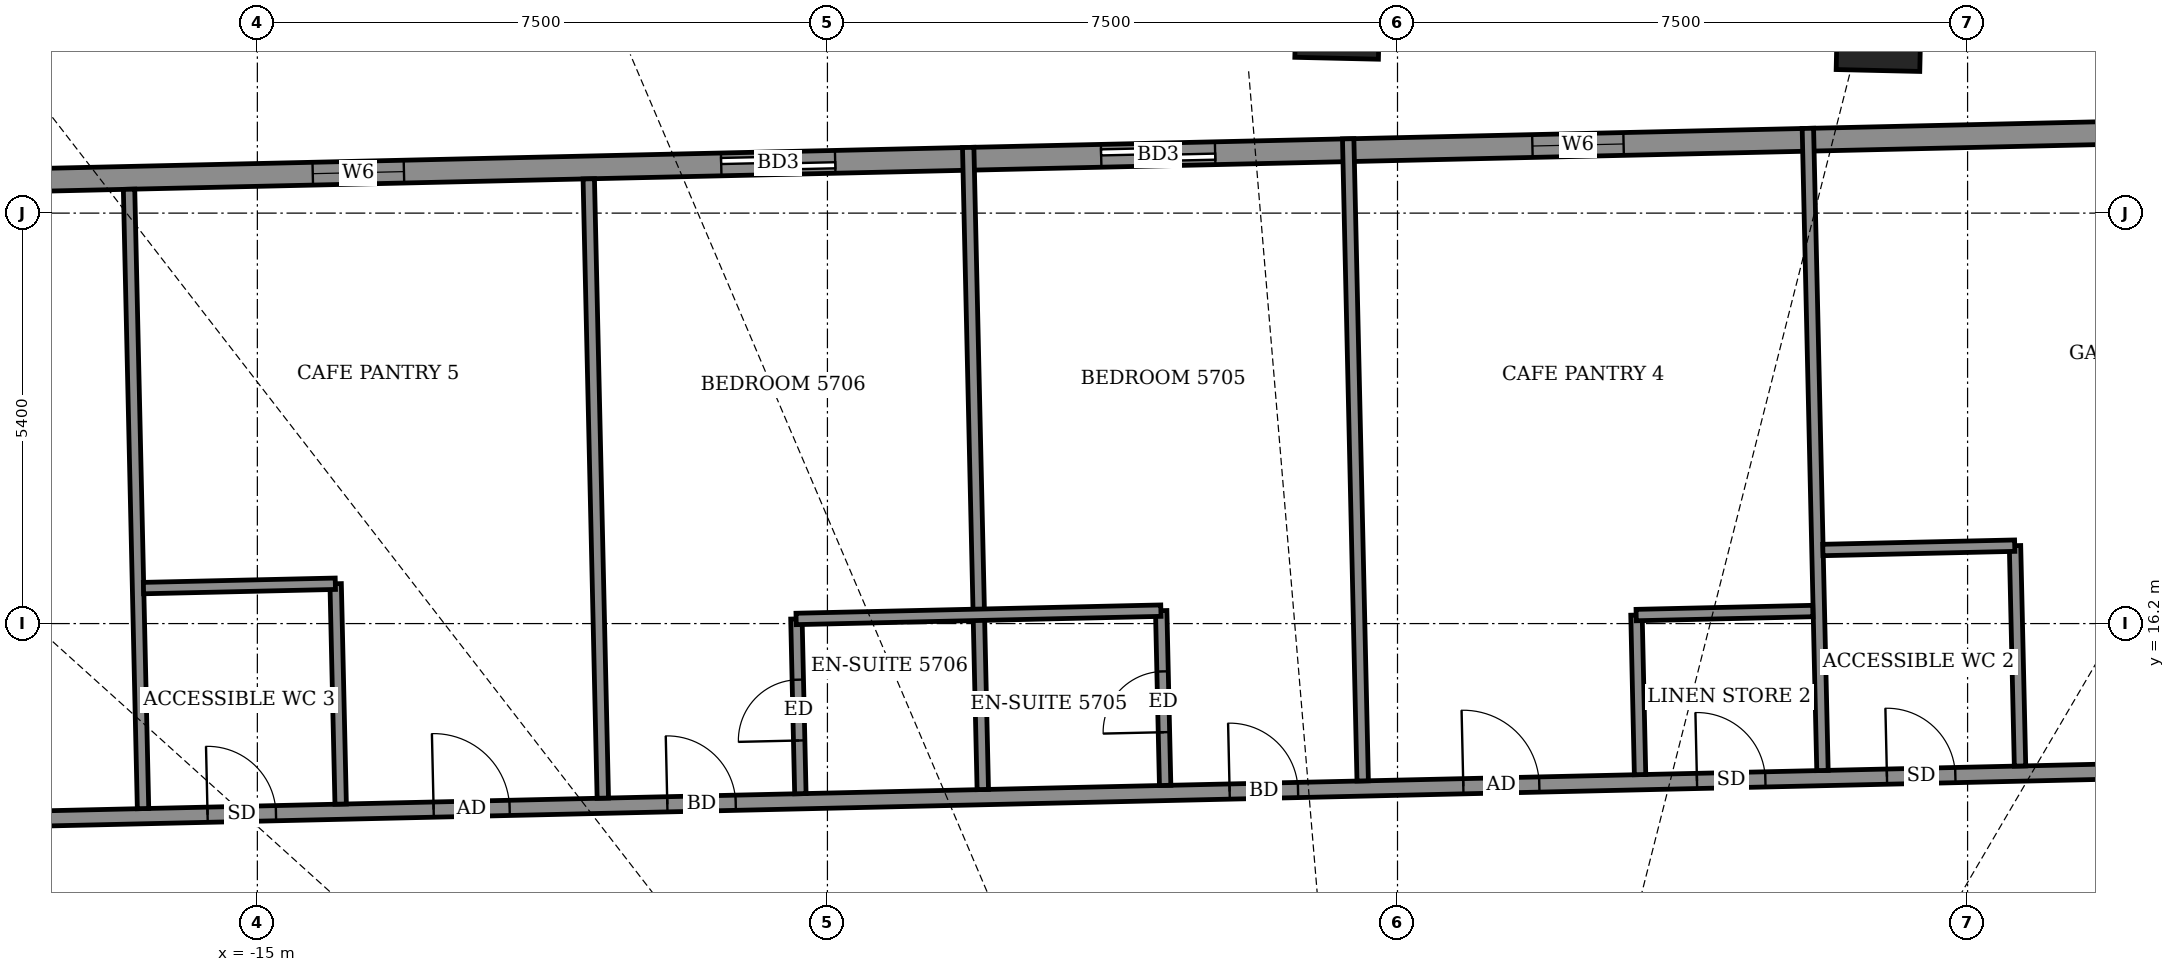
"""IFC4 building model, lengths in metres.
Left out: names, types, materials, properties, quantities, classifications, styles, units other than length and angle.
Written with IfcOpenShell. Run it as: python <this file> out.ifc"""

import sys

from ifc_helpers import new_model, si_unit, direction, frame, frame_2d, origin, origin_2d, place, context, subcontext, project, spatial, rectangle, extrude, element, fill, save


model = new_model("IFC4")
c1 = context("Model", 3, precision=1e-05, world=origin(), true_north=direction((0.0, 1.0)))
c2 = subcontext(c1, "Body", "Model", "MODEL_VIEW")
j1 = project(units=[si_unit("LENGTHUNIT", "METRE"), si_unit("PLANEANGLEUNIT", "RADIAN")], contexts=[c1])
p1 = place(None, origin())
s1 = spatial("IfcSite", under=j1, at=p1, CompositionType="ELEMENT")
p2 = place(p1, origin())
s2 = spatial("IfcBuilding", under=s1, at=p2, CompositionType="ELEMENT")
p3 = place(p2, frame((0.0, 0.0, 226.5)))
s3 = spatial("IfcBuildingStorey", under=s2, at=p3, CompositionType="ELEMENT", Elevation=226.5)
for number, where, z_axis, x_axis in (
    (1, (6.333, 24.026, -0.55), (0.0, 0.0, 1.0), (-1.0, 0.023, 0.0)),
    (2, (-0.789, 24.187, -0.55), (0.0, 0.0, 1.0), (-1.0, 0.023, 0.0)),
):
    element("IfcColumn", number, at=place(p3, frame(where, z_axis=z_axis, x_axis=x_axis)), inside=s3, PredefinedType="COLUMN", context=c2, shape_type="SweptSolid", body=[
        extrude(rectangle(XDim=1.1, YDim=1.1, at=origin_2d()), origin(), (0.0, 0.0, 1.0), 4.6),
    ])
p4 = place(p3, frame((20.403, 22.905, 0.0), z_axis=(0.0, 0.0, 1.0), x_axis=(-0.99974298964, -0.022670568288, 0.0)))
e3 = element("IfcWall", 3, at=p4, inside=s3, PredefinedType="SOLIDWALL", context=c2, shape_type="SweptSolid", body=[
    extrude(rectangle(XDim=44.509, YDim=0.3, at=frame_2d((22.254, 0.0))), origin(), (0.0, 0.0, 1.0), 2.45),
])
p5 = place(p4, frame((2.846, 0.0, 0.0)))
e4 = element("IfcOpeningElement", 4, at=p5, cuts=e3, PredefinedType="OPENING", context=c2, shape_type="SweptSolid", body=[
    extrude(rectangle(XDim=1.5, YDim=2.0, at=frame_2d((0.75, 1.0))), frame((0.0, 0.16, 0.0), z_axis=(0.0, -1.0, 0.0), x_axis=(1.0, 0.0, 0.0)), (0.0, 0.0, 1.0), 0.32),
])
p6 = place(p4, frame((9.937, 0.0, 0.5)))
e5 = element("IfcOpeningElement", 5, at=p6, cuts=e3, PredefinedType="OPENING", context=c2, shape_type="SweptSolid", body=[
    extrude(rectangle(XDim=1.2, YDim=1.1, at=frame_2d((0.6, 0.55))), frame((0.0, 0.16, 0.0), z_axis=(0.0, -1.0, 0.0), x_axis=(1.0, 0.0, 0.0)), (0.0, 0.0, 1.0), 0.32),
])
p7 = place(p4, frame((17.433, 0.0, 0.5)))
e6 = element("IfcOpeningElement", 6, at=p7, cuts=e3, PredefinedType="OPENING", context=c2, shape_type="SweptSolid", body=[
    extrude(rectangle(XDim=1.2, YDim=1.1, at=frame_2d((0.6, 0.55))), frame((0.0, 0.16, 0.0), z_axis=(0.0, -1.0, 0.0), x_axis=(1.0, 0.0, 0.0)), (0.0, 0.0, 1.0), 0.32),
])
p8 = place(p4, frame((22.808, 0.0, 0.0)))
e7 = element("IfcOpeningElement", 7, at=p8, cuts=e3, PredefinedType="OPENING", context=c2, shape_type="SweptSolid", body=[
    extrude(rectangle(XDim=1.5, YDim=2.0, at=frame_2d((0.75, 1.0))), frame((0.0, 0.16, 0.0), z_axis=(0.0, -1.0, 0.0), x_axis=(1.0, 0.0, 0.0)), (0.0, 0.0, 1.0), 0.32),
])
p9 = place(p4, frame((27.808, 0.0, 0.0)))
e8 = element("IfcOpeningElement", 8, at=p9, cuts=e3, PredefinedType="OPENING", context=c2, shape_type="SweptSolid", body=[
    extrude(rectangle(XDim=1.5, YDim=2.0, at=frame_2d((0.75, 1.0))), frame((0.0, 0.16, 0.0), z_axis=(0.0, -1.0, 0.0), x_axis=(1.0, 0.0, 0.0)), (0.0, 0.0, 1.0), 0.32),
])
p10 = place(p4, frame((33.483, 0.0, 0.5)))
e9 = element("IfcOpeningElement", 9, at=p10, cuts=e3, PredefinedType="OPENING", context=c2, shape_type="SweptSolid", body=[
    extrude(rectangle(XDim=1.2, YDim=1.1, at=frame_2d((0.6, 0.55))), frame((0.0, 0.16, 0.0), z_axis=(0.0, -1.0, 0.0), x_axis=(1.0, 0.0, 0.0)), (0.0, 0.0, 1.0), 0.32),
])
p11 = place(p4, frame((40.283, 0.0, 0.5)))
e10 = element("IfcOpeningElement", 10, at=p11, cuts=e3, PredefinedType="OPENING", context=c2, shape_type="SweptSolid", body=[
    extrude(rectangle(XDim=1.2, YDim=1.1, at=frame_2d((0.6, 0.55))), frame((0.0, 0.16, 0.0), z_axis=(0.0, -1.0, 0.0), x_axis=(1.0, 0.0, 0.0)), (0.0, 0.0, 1.0), 0.32),
])
p12 = place(p3, frame((-27.652, 13.413, 0.0), z_axis=(0.0, 0.0, 1.0), x_axis=(0.999742712492, 0.022682786863, 0.0)))
e11 = element("IfcWall", 11, at=p12, inside=s3, PredefinedType="PARTITIONING", context=c2, shape_type="SweptSolid", body=[
    extrude(rectangle(XDim=49.113, YDim=0.2, at=frame_2d((24.556, 0.0))), origin(), (0.0, 0.0, 1.0), 2.45),
])
p13 = place(p12, frame((47.529, 0.0, 0.0)))
e12 = element("IfcOpeningElement", 12, at=p13, cuts=e11, PredefinedType="OPENING", context=c2, shape_type="SweptSolid", body=[
    extrude(rectangle(XDim=1.0, YDim=2.1, at=frame_2d((0.5, 1.05))), frame((0.0, 0.11, 0.0), z_axis=(0.0, -1.0, 0.0), x_axis=(1.0, 0.0, 0.0)), (0.0, 0.0, 1.0), 0.22),
])
p14 = place(p12, frame((41.6, 0.0, 0.0)))
e13 = element("IfcOpeningElement", 13, at=p14, cuts=e11, PredefinedType="OPENING", context=c2, shape_type="SweptSolid", body=[
    extrude(rectangle(XDim=0.9, YDim=2.1, at=frame_2d((0.45, 1.05))), frame((0.0, 0.11, 0.0), z_axis=(0.0, -1.0, 0.0), x_axis=(1.0, 0.0, 0.0)), (0.0, 0.0, 1.0), 0.22),
])
p15 = place(p12, frame((37.85, 0.0, 0.0)))
e14 = element("IfcOpeningElement", 14, at=p15, cuts=e11, PredefinedType="OPENING", context=c2, shape_type="SweptSolid", body=[
    extrude(rectangle(XDim=1.0, YDim=2.1, at=frame_2d((0.5, 1.05))), frame((0.0, 0.11, 0.0), z_axis=(0.0, -1.0, 0.0), x_axis=(1.0, 0.0, 0.0)), (0.0, 0.0, 1.0), 0.22),
])
p16 = place(p12, frame((34.1, 0.0, 0.0)))
e15 = element("IfcOpeningElement", 15, at=p16, cuts=e11, PredefinedType="OPENING", context=c2, shape_type="SweptSolid", body=[
    extrude(rectangle(XDim=0.9, YDim=2.1, at=frame_2d((0.45, 1.05))), frame((0.0, 0.11, 0.0), z_axis=(0.0, -1.0, 0.0), x_axis=(1.0, 0.0, 0.0)), (0.0, 0.0, 1.0), 0.22),
])
p17 = place(p12, frame((28.525, 0.0, 0.0)))
e16 = element("IfcOpeningElement", 16, at=p17, cuts=e11, PredefinedType="OPENING", context=c2, shape_type="SweptSolid", body=[
    extrude(rectangle(XDim=1.0, YDim=2.1, at=frame_2d((0.5, 1.05))), frame((0.0, 0.11, 0.0), z_axis=(0.0, -1.0, 0.0), x_axis=(1.0, 0.0, 0.0)), (0.0, 0.0, 1.0), 0.22),
])
p18 = place(p12, frame((31.6, 0.0, 0.0)))
e17 = element("IfcOpeningElement", 17, at=p18, cuts=e11, PredefinedType="OPENING", context=c2, shape_type="SweptSolid", body=[
    extrude(rectangle(XDim=0.9, YDim=2.1, at=frame_2d((0.45, 1.05))), frame((0.0, 0.11, 0.0), z_axis=(0.0, -1.0, 0.0), x_axis=(1.0, 0.0, 0.0)), (0.0, 0.0, 1.0), 0.22),
])
p19 = place(p12, frame((25.45, 0.0, 0.0)))
e18 = element("IfcOpeningElement", 18, at=p19, cuts=e11, PredefinedType="OPENING", context=c2, shape_type="SweptSolid", body=[
    extrude(rectangle(XDim=0.9, YDim=2.1, at=frame_2d((0.45, 1.05))), frame((0.0, 0.11, 0.0), z_axis=(0.0, -1.0, 0.0), x_axis=(1.0, 0.0, 0.0)), (0.0, 0.0, 1.0), 0.22),
])
p20 = place(p12, frame((18.05, 0.0, 0.0)))
e19 = element("IfcOpeningElement", 19, at=p20, cuts=e11, PredefinedType="OPENING", context=c2, shape_type="SweptSolid", body=[
    extrude(rectangle(XDim=0.9, YDim=2.1, at=frame_2d((0.45, 1.05))), frame((0.0, 0.11, 0.0), z_axis=(0.0, -1.0, 0.0), x_axis=(1.0, 0.0, 0.0)), (0.0, 0.0, 1.0), 0.22),
])
p21 = place(p12, frame((14.975, 0.0, 0.0)))
e20 = element("IfcOpeningElement", 20, at=p21, cuts=e11, PredefinedType="OPENING", context=c2, shape_type="SweptSolid", body=[
    extrude(rectangle(XDim=1.0, YDim=2.1, at=frame_2d((0.5, 1.05))), frame((0.0, 0.11, 0.0), z_axis=(0.0, -1.0, 0.0), x_axis=(1.0, 0.0, 0.0)), (0.0, 0.0, 1.0), 0.22),
])
p22 = place(p12, frame((12.0, 0.0, 0.0)))
e21 = element("IfcOpeningElement", 21, at=p22, cuts=e11, PredefinedType="OPENING", context=c2, shape_type="SweptSolid", body=[
    extrude(rectangle(XDim=0.9, YDim=2.1, at=frame_2d((0.45, 1.05))), frame((0.0, 0.11, 0.0), z_axis=(0.0, -1.0, 0.0), x_axis=(1.0, 0.0, 0.0)), (0.0, 0.0, 1.0), 0.22),
])
p23 = place(p12, frame((5.354, 0.0, 0.0)))
e22 = element("IfcOpeningElement", 22, at=p23, cuts=e11, PredefinedType="OPENING", context=c2, shape_type="SweptSolid", body=[
    extrude(rectangle(XDim=1.0, YDim=2.1, at=frame_2d((0.5, 1.05))), frame((0.0, 0.11, 0.0), z_axis=(0.0, -1.0, 0.0), x_axis=(1.0, 0.0, 0.0)), (0.0, 0.0, 1.0), 0.22),
])
p24 = place(p3, frame((-16.504, 13.766, 0.0), z_axis=(0.0, 0.0, 1.0), x_axis=(-0.022586673637, 0.999744888546, 0.0)))
e23 = element("IfcWall", 23, at=p24, inside=s3, PredefinedType="PARTITIONING", context=c2, shape_type="SweptSolid", body=[
    extrude(rectangle(XDim=8.15, YDim=0.15, at=frame_2d((4.075, 0.0))), origin(), (0.0, 0.0, 1.0), 2.45),
])
p25 = place(p3, frame((-13.904, 13.825, 0.0), z_axis=(0.0, 0.0, 1.0), x_axis=(-0.022730967319, 0.999741618182, 0.0)))
e24 = element("IfcWall", 24, at=p25, inside=s3, PredefinedType="PARTITIONING", context=c2, shape_type="SweptSolid", body=[
    extrude(rectangle(XDim=2.9, YDim=0.15, at=frame_2d((1.45, 0.0))), origin(), (0.0, 0.0, 1.0), 4.05),
])
p26 = place(p3, frame((-10.455, 13.903, 0.0), z_axis=(0.0, 0.0, 1.0), x_axis=(-0.022676494918, 0.999742855227, 0.0)))
e25 = element("IfcWall", 25, at=p26, inside=s3, PredefinedType="PARTITIONING", context=c2, shape_type="SweptSolid", body=[
    extrude(rectangle(XDim=8.15, YDim=0.15, at=frame_2d((4.075, 0.0))), origin(), (0.0, 0.0, 1.0), 2.45),
])
p27 = place(p3, frame((-7.856, 13.962, 0.0), z_axis=(0.0, 0.0, 1.0), x_axis=(-0.022612884682, 0.999744296031, 0.0)))
e26 = element("IfcWall", 26, at=p27, inside=s3, PredefinedType="PARTITIONING", context=c2, shape_type="SweptSolid", body=[
    extrude(rectangle(XDim=2.3, YDim=0.15, at=frame_2d((1.15, 0.0))), origin(), (0.0, 0.0, 1.0), 4.05),
])
p28 = place(p27, frame((0.7, 0.0, 0.0)))
e27 = element("IfcOpeningElement", 27, at=p28, cuts=e26, PredefinedType="OPENING", context=c2, shape_type="SweptSolid", body=[
    extrude(rectangle(XDim=0.8, YDim=2.1, at=frame_2d((0.4, 1.05))), frame((0.0, 0.085, 0.0), z_axis=(0.0, -1.0, 0.0), x_axis=(1.0, 0.0, 0.0)), (0.0, 0.0, 1.0), 0.17),
])
p29 = place(p3, frame((-5.456, 14.017, 0.0), z_axis=(0.0, 0.0, 1.0), x_axis=(-0.022711559831, 0.999742059258, 0.0)))
e28 = element("IfcWall", 28, at=p29, inside=s3, PredefinedType="PARTITIONING", context=c2, shape_type="SweptSolid", body=[
    extrude(rectangle(XDim=8.449, YDim=0.15, at=frame_2d((4.225, 0.0))), origin(), (0.0, 0.0, 1.0), 2.65),
])
p30 = place(p3, frame((-3.057, 14.071, 0.0), z_axis=(0.0, 0.0, 1.0), x_axis=(-0.022612884682, 0.999744296031, 0.0)))
e29 = element("IfcWall", 29, at=p30, inside=s3, PredefinedType="PARTITIONING", context=c2, shape_type="SweptSolid", body=[
    extrude(rectangle(XDim=2.3, YDim=0.15, at=frame_2d((1.15, 0.0))), origin(), (0.0, 0.0, 1.0), 4.05),
])
p31 = place(p30, frame((0.7, 0.0, 0.0)))
e30 = element("IfcOpeningElement", 30, at=p31, cuts=e29, PredefinedType="OPENING", context=c2, shape_type="SweptSolid", body=[
    extrude(rectangle(XDim=0.8, YDim=2.1, at=frame_2d((0.4, 1.05))), frame((0.0, 0.085, 0.0), z_axis=(0.0, -1.0, 0.0), x_axis=(1.0, 0.0, 0.0)), (0.0, 0.0, 1.0), 0.17),
])
p32 = place(p3, frame((-0.458, 14.13, 0.0), z_axis=(0.0, 0.0, 1.0), x_axis=(-0.022593427839, 0.999744735929, 0.0)))
e31 = element("IfcWall", 31, at=p32, inside=s3, PredefinedType="PARTITIONING", context=c2, shape_type="SweptSolid", body=[
    extrude(rectangle(XDim=8.45, YDim=0.15, at=frame_2d((4.225, 0.0))), origin(), (0.0, 0.0, 1.0), 2.85),
])
p33 = place(p3, frame((3.191, 14.213, 0.0), z_axis=(0.0, 0.0, 1.0), x_axis=(-0.022325208909, 0.999750761464, 0.0)))
e32 = element("IfcWall", 32, at=p33, inside=s3, PredefinedType="PARTITIONING", context=c2, shape_type="SweptSolid", body=[
    extrude(rectangle(XDim=2.1, YDim=0.15, at=frame_2d((1.05, 0.0))), origin(), (0.0, 0.0, 1.0), 2.75),
])
p34 = place(p3, frame((5.591, 14.267, 0.0), z_axis=(0.0, 0.0, 1.0), x_axis=(-0.022737812646, 0.999741462517, 0.0)))
e33 = element("IfcWall", 33, at=p34, inside=s3, PredefinedType="PARTITIONING", context=c2, shape_type="SweptSolid", body=[
    extrude(rectangle(XDim=8.45, YDim=0.15, at=frame_2d((4.225, 0.0))), origin(), (0.0, 0.0, 1.0), 2.75),
])
p35 = place(p3, frame((8.19, 14.326, 0.0), z_axis=(0.0, 0.0, 1.0), x_axis=(-0.022730967319, 0.999741618182, 0.0)))
e34 = element("IfcWall", 34, at=p35, inside=s3, PredefinedType="PARTITIONING", context=c2, shape_type="SweptSolid", body=[
    extrude(rectangle(XDim=2.9, YDim=0.15, at=frame_2d((1.45, 0.0))), origin(), (0.0, 0.0, 1.0), 2.55),
])
p36 = place(p3, frame((3.14, 16.312, 0.0), z_axis=(0.0, 0.0, 1.0), x_axis=(0.99974031529, 0.022788198363, 0.0)))
e35 = element("IfcWall", 35, at=p36, inside=s3, PredefinedType="PARTITIONING", context=c2, shape_type="SweptSolid", body=[
    extrude(rectangle(XDim=2.325, YDim=0.15, at=frame_2d((1.162, 0.0))), origin(), (0.0, 0.0, 1.0), 2.75),
])
p37 = place(p3, frame((-7.912, 16.261, 0.0), z_axis=(0.0, 0.0, 1.0), x_axis=(0.99974154664, 0.022734113616, 0.0)))
e36 = element("IfcWall", 36, at=p37, inside=s3, PredefinedType="PARTITIONING", context=c2, shape_type="SweptSolid", body=[
    extrude(rectangle(XDim=4.8, YDim=0.15, at=frame_2d((2.4, 0.0))), origin(), (0.0, 0.0, 1.0), 2.65),
])
p38 = place(p3, frame((-16.498, 16.667, 0.0), z_axis=(0.0, 0.0, 1.0), x_axis=(0.99974392816, 0.022629142889, 0.0)))
e37 = element("IfcWall", 37, at=p38, inside=s3, PredefinedType="PARTITIONING", context=c2, shape_type="SweptSolid", body=[
    extrude(rectangle(XDim=2.525, YDim=0.15, at=frame_2d((1.262, 0.0))), origin(), (0.0, 0.0, 1.0), 4.05),
])
p39 = place(p3, frame((5.596, 17.168, 0.0), z_axis=(0.0, 0.0, 1.0), x_axis=(0.999743977673, 0.022626955293, 0.0)))
e38 = element("IfcWall", 38, at=p39, inside=s3, PredefinedType="PARTITIONING", context=c2, shape_type="SweptSolid", body=[
    extrude(rectangle(XDim=2.525, YDim=0.15, at=frame_2d((1.262, 0.0))), origin(), (0.0, 0.0, 1.0), 4.05),
])
p40 = place(p7, origin())
e39 = element("IfcWindow", 39, at=p40, inside=s3, PartitioningType="SINGLE_PANEL", PredefinedType="WINDOW", context=c2, shape_type="SweptSolid", body=[
    extrude(rectangle(XDim=1.2, YDim=1.1, at=frame_2d((0.6, 0.55))), frame((0.0, 0.03, 0.0), z_axis=(0.0, -1.0, 0.0), x_axis=(1.0, 0.0, 0.0)), (0.0, 0.0, 1.0), 0.06),
])
fill(e6, e39)
p41 = place(p8, origin())
e40 = element("IfcDoor", 40, at=p41, inside=s3, OperationType="SLIDING_TO_LEFT", PredefinedType="DOOR", context=c2, shape_type="SweptSolid", body=[
    extrude(rectangle(XDim=1.5, YDim=2.0, at=frame_2d((0.75, 1.0))), frame((0.0, 0.025, 0.0), z_axis=(0.0, -1.0, 0.0), x_axis=(1.0, 0.0, 0.0)), (0.0, 0.0, 1.0), 0.05),
])
fill(e7, e40)
p42 = place(p9, origin())
e41 = element("IfcDoor", 41, at=p42, inside=s3, OperationType="SLIDING_TO_LEFT", PredefinedType="DOOR", context=c2, shape_type="SweptSolid", body=[
    extrude(rectangle(XDim=1.5, YDim=2.0, at=frame_2d((0.75, 1.0))), frame((0.0, 0.025, 0.0), z_axis=(0.0, -1.0, 0.0), x_axis=(1.0, 0.0, 0.0)), (0.0, 0.0, 1.0), 0.05),
])
fill(e8, e41)
p43 = place(p10, origin())
e42 = element("IfcWindow", 42, at=p43, inside=s3, PartitioningType="SINGLE_PANEL", PredefinedType="WINDOW", context=c2, shape_type="SweptSolid", body=[
    extrude(rectangle(XDim=1.2, YDim=1.1, at=frame_2d((0.6, 0.55))), frame((0.0, 0.03, 0.0), z_axis=(0.0, -1.0, 0.0), x_axis=(1.0, 0.0, 0.0)), (0.0, 0.0, 1.0), 0.06),
])
fill(e9, e42)
p44 = place(p16, origin())
e43 = element("IfcDoor", 43, at=p44, inside=s3, OperationType="SINGLE_SWING_LEFT", PredefinedType="DOOR", context=c2, shape_type="SweptSolid", body=[
    extrude(rectangle(XDim=0.9, YDim=2.1, at=frame_2d((0.45, 1.05))), frame((0.0, 0.025, 0.0), z_axis=(0.0, -1.0, 0.0), x_axis=(1.0, 0.0, 0.0)), (0.0, 0.0, 1.0), 0.05),
])
fill(e15, e43)
p45 = place(p17, origin())
e44 = element("IfcDoor", 44, at=p45, inside=s3, OperationType="SINGLE_SWING_LEFT", PredefinedType="DOOR", context=c2, shape_type="SweptSolid", body=[
    extrude(rectangle(XDim=1.0, YDim=2.1, at=frame_2d((0.5, 1.05))), frame((0.0, 0.025, 0.0), z_axis=(0.0, -1.0, 0.0), x_axis=(1.0, 0.0, 0.0)), (0.0, 0.0, 1.0), 0.05),
])
fill(e16, e44)
p46 = place(p18, origin())
e45 = element("IfcDoor", 45, at=p46, inside=s3, OperationType="SINGLE_SWING_RIGHT", PredefinedType="DOOR", context=c2, shape_type="SweptSolid", body=[
    extrude(rectangle(XDim=0.9, YDim=2.1, at=frame_2d((0.45, 1.05))), frame((0.0, 0.025, 0.0), z_axis=(0.0, -1.0, 0.0), x_axis=(1.0, 0.0, 0.0)), (0.0, 0.0, 1.0), 0.05),
])
fill(e17, e45)
p47 = place(p19, origin())
e46 = element("IfcDoor", 46, at=p47, inside=s3, OperationType="SINGLE_SWING_LEFT", PredefinedType="DOOR", context=c2, shape_type="SweptSolid", body=[
    extrude(rectangle(XDim=0.9, YDim=2.1, at=frame_2d((0.45, 1.05))), frame((0.0, 0.025, 0.0), z_axis=(0.0, -1.0, 0.0), x_axis=(1.0, 0.0, 0.0)), (0.0, 0.0, 1.0), 0.05),
])
fill(e18, e46)
p48 = place(p31, origin())
e47 = element("IfcDoor", 47, at=p48, inside=s3, OperationType="SINGLE_SWING_LEFT", PredefinedType="DOOR", context=c2, shape_type="SweptSolid", body=[
    extrude(rectangle(XDim=0.8, YDim=2.1, at=frame_2d((0.4, 1.05))), frame((0.0, 0.025, 0.0), z_axis=(0.0, -1.0, 0.0), x_axis=(1.0, 0.0, 0.0)), (0.0, 0.0, 1.0), 0.05),
])
fill(e30, e47)
p49 = place(p20, origin())
e48 = element("IfcDoor", 48, at=p49, inside=s3, OperationType="SINGLE_SWING_RIGHT", PredefinedType="DOOR", context=c2, shape_type="SweptSolid", body=[
    extrude(rectangle(XDim=0.9, YDim=2.1, at=frame_2d((0.45, 1.05))), frame((0.0, 0.025, 0.0), z_axis=(0.0, -1.0, 0.0), x_axis=(1.0, 0.0, 0.0)), (0.0, 0.0, 1.0), 0.05),
])
fill(e19, e48)
p50 = place(p28, origin())
e49 = element("IfcDoor", 49, at=p50, inside=s3, OperationType="SINGLE_SWING_RIGHT", PredefinedType="DOOR", context=c2, shape_type="SweptSolid", body=[
    extrude(rectangle(XDim=0.8, YDim=2.1, at=frame_2d((0.4, 1.05))), frame((0.0, 0.025, 0.0), z_axis=(0.0, -1.0, 0.0), x_axis=(1.0, 0.0, 0.0)), (0.0, 0.0, 1.0), 0.05),
])
fill(e27, e49)
p51 = place(p21, origin())
e50 = element("IfcDoor", 50, at=p51, inside=s3, OperationType="SINGLE_SWING_RIGHT", PredefinedType="DOOR", context=c2, shape_type="SweptSolid", body=[
    extrude(rectangle(XDim=1.0, YDim=2.1, at=frame_2d((0.5, 1.05))), frame((0.0, 0.025, 0.0), z_axis=(0.0, -1.0, 0.0), x_axis=(1.0, 0.0, 0.0)), (0.0, 0.0, 1.0), 0.05),
])
fill(e20, e50)
p52 = place(p22, origin())
e51 = element("IfcDoor", 51, at=p52, inside=s3, OperationType="SINGLE_SWING_LEFT", PredefinedType="DOOR", context=c2, shape_type="SweptSolid", body=[
    extrude(rectangle(XDim=0.9, YDim=2.1, at=frame_2d((0.45, 1.05))), frame((0.0, 0.025, 0.0), z_axis=(0.0, -1.0, 0.0), x_axis=(1.0, 0.0, 0.0)), (0.0, 0.0, 1.0), 0.05),
])
fill(e21, e51)
save(model, sys.argv[1])
